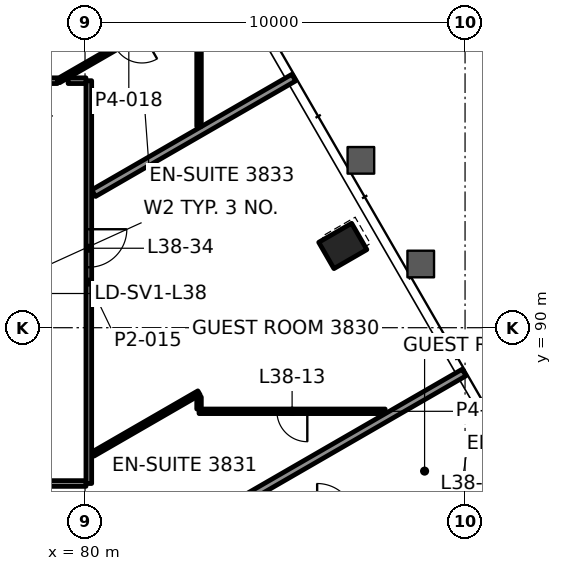
"""IFC4 building model, lengths in metres.
Left out: names, types, materials, properties, quantities, classifications, styles, units other than length and angle.
Written with IfcOpenShell. Run it as: python <this file> out.ifc"""

import sys

from ifc_helpers import new_model, si_unit, direction, frame, frame_2d, origin, origin_2d, place, context, subcontext, project, spatial, rectangle, hollow_rectangle, extrude, element, fill, save


model = new_model("IFC4")
c1 = context("Model", 3, precision=1e-05, world=origin(), true_north=direction((0.0, 1.0)))
c2 = subcontext(c1, "Body", "Model", "MODEL_VIEW")
j1 = project(units=[si_unit("LENGTHUNIT", "METRE"), si_unit("PLANEANGLEUNIT", "RADIAN")], contexts=[c1])
p1 = place(None, origin())
s1 = spatial("IfcSite", under=j1, at=p1, CompositionType="ELEMENT")
p2 = place(p1, origin())
s2 = spatial("IfcBuilding", under=s1, at=p2, CompositionType="ELEMENT")
p3 = place(p2, frame((0.0, 0.0, 167.5)))
s3 = spatial("IfcBuildingStorey", under=s2, at=p3, CompositionType="ELEMENT", Elevation=167.5)
p4 = place(p3, frame((86.782, 92.151, -0.0), z_axis=(0.0, 0.0, 1.0), x_axis=(-0.5, 0.866025403784, 0.0)))
e1 = element("IfcColumn", 1, at=p4, inside=s3, PredefinedType="COLUMN", context=c2, shape_type="SweptSolid", body=[
    extrude(hollow_rectangle(XDim=0.8, YDim=1.0, WallThickness=0.05, at=origin_2d()), origin(), (0.0, 0.0, 1.0), 3.9),
])
p5 = place(p3, frame((78.868, 85.9, 0.0), z_axis=(0.0, 0.0, 1.0), x_axis=(1.0, 0.0, 0.0)))
e2 = element("IfcWall", 2, at=p5, inside=s3, PredefinedType="PARTITIONING", context=c2, shape_type="SweptSolid", body=[
    extrude(rectangle(XDim=1.157, YDim=0.15, at=frame_2d((0.578, 0.0))), origin(), (0.0, 0.0, 1.0), 3.1),
])
p6 = place(p3, frame((87.898, 87.8, 0.0), z_axis=(0.0, 0.0, 1.0), x_axis=(-1.0, 0.0, 0.0)))
e3 = element("IfcWall", 3, at=p6, inside=s3, PredefinedType="PARTITIONING", context=c2, shape_type="SweptSolid", body=[
    extrude(rectangle(XDim=4.898, YDim=0.12, at=frame_2d((2.449, 0.0))), origin(), (0.0, 0.0, 1.0), 3.1),
])
p7 = place(p6, frame((2.049, 0.0, 0.0)))
e4 = element("IfcOpeningElement", 4, at=p7, cuts=e3, PredefinedType="OPENING", context=c2, shape_type="SweptSolid", body=[
    extrude(rectangle(XDim=0.8, YDim=2.1, at=frame_2d((0.4, 1.05))), frame((0.0, 0.07, 0.0), z_axis=(0.0, -1.0, 0.0), x_axis=(1.0, 0.0, 0.0)), (0.0, 0.0, 1.0), 0.14),
])
p8 = place(p3, frame((75.975, 96.5, 0.0), z_axis=(0.0, 0.0, 1.0), x_axis=(1.0, 0.0, 0.0)))
e5 = element("IfcWall", 5, at=p8, inside=s3, PredefinedType="PARTITIONING", context=c2, shape_type="SweptSolid", body=[
    extrude(rectangle(XDim=3.299, YDim=0.15, at=frame_2d((1.649, 0.0))), origin(), (0.0, 0.0, 1.0), 3.1),
])
p9 = place(p8, frame((1.814, 0.0, 0.0)))
e6 = element("IfcOpeningElement", 6, at=p9, cuts=e5, PredefinedType="OPENING", context=c2, shape_type="SweptSolid", body=[
    extrude(rectangle(XDim=1.0, YDim=2.1, at=frame_2d((0.5, 1.05))), frame((0.0, 0.085, 0.0), z_axis=(0.0, -1.0, 0.0), x_axis=(1.0, 0.0, 0.0)), (0.0, 0.0, 1.0), 0.17),
])
p10 = place(p3, frame((83.471, 85.065, 0.0), z_axis=(0.0, 0.0, 1.0), x_axis=(0.866022108301, 0.500005707901, 0.0)))
e7 = element("IfcWall", 7, at=p10, inside=s3, PredefinedType="PARTITIONING", context=c2, shape_type="SweptSolid", body=[
    extrude(rectangle(XDim=7.511, YDim=0.2, at=frame_2d((3.755, 0.0))), origin(), (0.0, 0.0, 1.0), 3.022),
])
p11 = place(p3, frame((80.209, 86.675, 0.0), z_axis=(0.0, 0.0, 1.0), x_axis=(0.86604299788, 0.499969524894, 0.0)))
e8 = element("IfcWall", 8, at=p11, inside=s3, PredefinedType="PARTITIONING", context=c2, shape_type="SweptSolid", body=[
    extrude(rectangle(XDim=3.222, YDim=0.12, at=frame_2d((1.611, 0.0))), origin(), (0.0, 0.0, 1.0), 3.1),
])
p12 = place(p3, frame((80.227, 93.541, 0.0), z_axis=(0.0, 0.0, 1.0), x_axis=(0.866033863416, 0.499985347202, 0.0)))
e9 = element("IfcWall", 9, at=p12, inside=s3, PredefinedType="PARTITIONING", context=c2, shape_type="SweptSolid", body=[
    extrude(rectangle(XDim=6.083, YDim=0.2, at=frame_2d((3.042, 0.0))), origin(), (0.0, 0.0, 1.0), 3.022),
])
p13 = place(p3, frame((83.0, 98.634, 0.0), z_axis=(0.0, 0.0, 1.0), x_axis=(-0.866013160285, -0.500021205763, 0.0)))
e10 = element("IfcWall", 10, at=p13, inside=s3, PredefinedType="PARTITIONING", context=c2, shape_type="SweptSolid", body=[
    extrude(rectangle(XDim=4.268, YDim=0.12, at=frame_2d((2.134, 0.0))), origin(), (0.0, 0.0, 1.0), 3.022),
])
p14 = place(p13, frame((1.734, 0.0, 0.0)))
e11 = element("IfcOpeningElement", 11, at=p14, cuts=e10, PredefinedType="OPENING", context=c2, shape_type="SweptSolid", body=[
    extrude(rectangle(XDim=0.8, YDim=2.1, at=frame_2d((0.4, 1.05))), frame((0.0, 0.07, 0.0), z_axis=(0.0, -1.0, 0.0), x_axis=(1.0, 0.0, 0.0)), (0.0, 0.0, 1.0), 0.14),
])
p15 = place(p3, frame((83.0, 87.86, 0.0), z_axis=(0.0, 0.0, 1.0), x_axis=(0.0, 1.0, 0.0)))
e12 = element("IfcWall", 12, at=p15, inside=s3, PredefinedType="PARTITIONING", context=c2, shape_type="SweptSolid", body=[
    extrude(rectangle(XDim=0.316, YDim=0.12, at=frame_2d((0.158, 0.0))), origin(), (0.0, 0.0, 1.0), 3.1),
])
p16 = place(p3, frame((83.0, 95.297, 0.0), z_axis=(0.0, 0.0, 1.0), x_axis=(0.0, 1.0, 0.0)))
e13 = element("IfcWall", 13, at=p16, inside=s3, PredefinedType="PARTITIONING", context=c2, shape_type="SweptSolid", body=[
    extrude(rectangle(XDim=3.228, YDim=0.12, at=frame_2d((1.614, 0.0))), origin(), (0.0, 0.0, 1.0), 3.022),
])
p17 = place(p3, frame((80.1, 96.5, 0.0), z_axis=(0.0, 0.0, 1.0), x_axis=(0.0, -1.0, 0.0)))
e14 = element("IfcWall", 14, at=p17, inside=s3, PredefinedType="PARTITIONING", context=c2, shape_type="SweptSolid", body=[
    extrude(rectangle(XDim=10.6, YDim=0.15, at=frame_2d((5.3, 0.0))), origin(), (0.0, 0.0, 1.0), 3.022),
])
p18 = place(p17, frame((3.909, 0.0, 0.0)))
e15 = element("IfcOpeningElement", 15, at=p18, cuts=e14, PredefinedType="OPENING", context=c2, shape_type="SweptSolid", body=[
    extrude(rectangle(XDim=1.0, YDim=2.1, at=frame_2d((0.5, 1.05))), frame((0.0, 0.085, 0.0), z_axis=(0.0, -1.0, 0.0), x_axis=(1.0, 0.0, 0.0)), (0.0, 0.0, 1.0), 0.17),
])
p19 = place(p3, frame((79.555, 96.5, 0.0), z_axis=(0.0, 0.0, 1.0), x_axis=(1.0, 0.0, 0.0)))
e16 = element("IfcWall", 16, at=p19, inside=s3, PredefinedType="PARTITIONING", context=c2, shape_type="SweptSolid", body=[
    extrude(rectangle(XDim=0.47, YDim=0.15, at=frame_2d((0.235, 0.0))), origin(), (0.0, 0.0, 1.0), 3.1),
])
p20 = place(p7, origin())
e17 = element("IfcDoor", 17, at=p20, inside=s3, OperationType="SINGLE_SWING_LEFT", PredefinedType="DOOR", context=c2, shape_type="SweptSolid", body=[
    extrude(rectangle(XDim=0.8, YDim=2.1, at=frame_2d((0.4, 1.05))), frame((0.0, 0.025, 0.0), z_axis=(0.0, -1.0, 0.0), x_axis=(1.0, 0.0, 0.0)), (0.0, 0.0, 1.0), 0.05),
])
fill(e4, e17)
p21 = place(p18, origin())
e18 = element("IfcDoor", 18, at=p21, inside=s3, OperationType="SINGLE_SWING_RIGHT", PredefinedType="DOOR", context=c2, shape_type="SweptSolid", body=[
    extrude(rectangle(XDim=1.0, YDim=2.1, at=frame_2d((0.5, 1.05))), frame((0.0, 0.025, 0.0), z_axis=(0.0, -1.0, 0.0), x_axis=(1.0, 0.0, 0.0)), (0.0, 0.0, 1.0), 0.05),
])
fill(e15, e18)
p22 = place(p3, origin())
p23 = place(p22, frame((86.251, 95.362, 0.15), z_axis=(0.0, 0.0, 1.0), x_axis=(-0.5, 0.866025, 0.0)))
p24 = place(p23, origin())
e19 = element("IfcWindow", 19, at=p24, inside=s3, PartitioningType="SINGLE_PANEL", PredefinedType="WINDOW", context=c2, shape_type="SweptSolid", body=[
    extrude(rectangle(XDim=2.912, YDim=3.55, at=frame_2d((1.456, 1.775))), frame((0.0, 0.03, 0.0), z_axis=(0.0, -1.0, 0.0), x_axis=(1.0, 0.0, 0.0)), (0.0, 0.0, 1.0), 0.06),
])
save(model, sys.argv[1])
